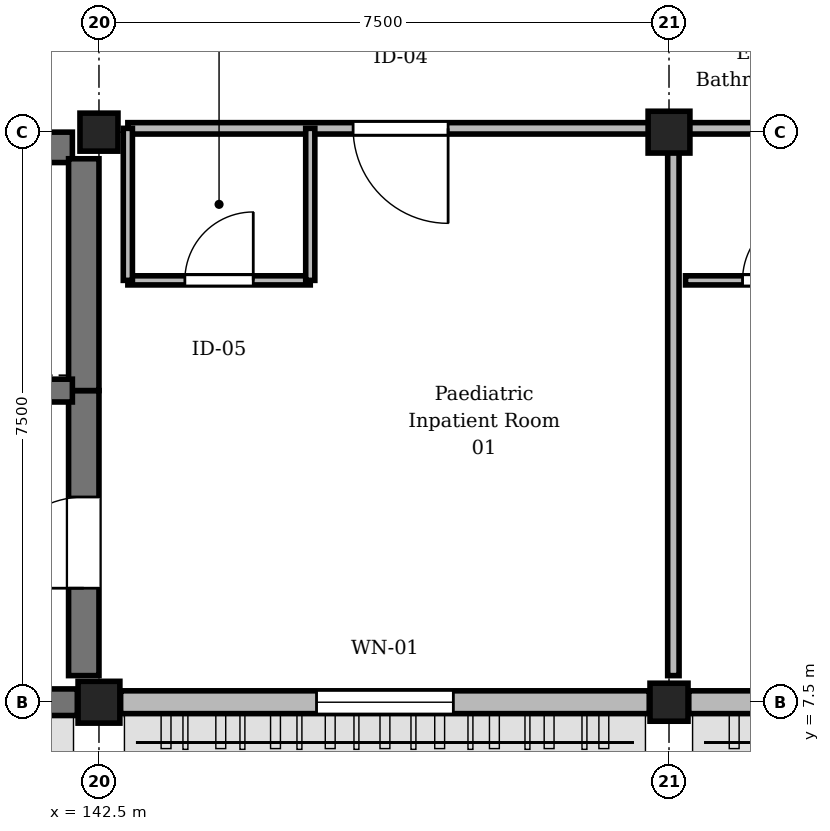
"""IFC4 building model, lengths in metres.
Left out: names, types, materials, properties, quantities, classifications, styles, units other than length and angle.
Written with IfcOpenShell. Run it as: python <this file> out.ifc"""

import sys

from ifc_helpers import new_model, si_unit, direction, frame, frame_2d, origin, origin_2d, place, context, subcontext, project, spatial, rectangle, extrude, element, fill, save


model = new_model("IFC4")
c1 = context("Model", 3, precision=1e-05, world=origin(), true_north=direction((0.0, 1.0)))
c2 = subcontext(c1, "Body", "Model", "MODEL_VIEW")
j1 = project(units=[si_unit("LENGTHUNIT", "METRE"), si_unit("PLANEANGLEUNIT", "RADIAN")], contexts=[c1])
p1 = place(None, origin())
s1 = spatial("IfcSite", under=j1, at=p1, CompositionType="ELEMENT")
p2 = place(p1, origin())
s2 = spatial("IfcBuilding", under=s1, at=p2, CompositionType="ELEMENT")
p3 = place(p2, frame((0.0, 0.0, 17.85)))
s3 = spatial("IfcBuildingStorey", under=s2, at=p3, CompositionType="ELEMENT", Elevation=17.85)
p4 = place(p3, frame((142.5, 7.5, 0.0), z_axis=(0.0, 0.0, 1.0), x_axis=(1.0, 0.0, 0.0)))
e1 = element("IfcColumn", 1, at=p4, inside=s3, PredefinedType="COLUMN", context=c2, shape_type="SweptSolid", body=[
    extrude(rectangle(XDim=0.55, YDim=0.55, at=origin_2d()), origin(), (0.0, 0.0, 1.0), 4.05),
])
for number, where, z_axis, x_axis in (
    (2, (142.5, 15.0, 0.0), (0.0, 0.0, 1.0), (1.0, 0.0, 0.0)),
    (3, (150.0, 7.5, 0.0), (0.0, 0.0, 1.0), (1.0, 0.0, 0.0)),
):
    element("IfcColumn", number, at=place(p3, frame(where, z_axis=z_axis, x_axis=x_axis)), inside=s3, PredefinedType="COLUMN", context=c2, shape_type="SweptSolid", body=[
        extrude(rectangle(XDim=0.5, YDim=0.5, at=origin_2d()), origin(), (0.0, 0.0, 1.0), 4.05),
    ])
p5 = place(p3, frame((150.0, 15.0, 0.0), z_axis=(0.0, 0.0, 1.0), x_axis=(1.0, 0.0, 0.0)))
e4 = element("IfcColumn", 4, at=p5, inside=s3, PredefinedType="COLUMN", context=c2, shape_type="SweptSolid", body=[
    extrude(rectangle(XDim=0.55, YDim=0.55, at=origin_2d()), origin(), (0.0, 0.0, 1.0), 4.05),
])
p6 = place(p3, frame((142.215, 7.5, 0.0), z_axis=(0.0, 0.0, 1.0), x_axis=(-1.0, 0.0, 0.0)))
e5 = element("IfcWall", 5, at=p6, inside=s3, PredefinedType="SHEAR", context=c2, shape_type="SweptSolid", body=[
    extrude(rectangle(XDim=6.955, YDim=0.35, at=frame_2d((3.478, 0.0))), origin(), (0.0, 0.0, 1.0), 3.77),
])
p7 = place(p3, frame((149.74, 7.5, 0.0), z_axis=(0.0, 0.0, 1.0), x_axis=(-1.0, 0.0, 0.0)))
e6 = element("IfcWall", 6, at=p7, inside=s3, PredefinedType="STANDARD", context=c2, shape_type="SweptSolid", body=[
    extrude(rectangle(XDim=6.955, YDim=0.3, at=frame_2d((3.478, 0.0))), origin(), (0.0, 0.0, 1.0), 3.17),
])
p8 = place(p7, frame((2.577, 0.0, 0.9)))
e7 = element("IfcOpeningElement", 7, at=p8, cuts=e6, PredefinedType="OPENING", context=c2, shape_type="SweptSolid", body=[
    extrude(rectangle(XDim=1.8, YDim=1.99, at=frame_2d((0.9, 0.995))), frame((0.0, 0.16, 0.0), z_axis=(0.0, -1.0, 0.0), x_axis=(1.0, 0.0, 0.0)), (0.0, 0.0, 1.0), 0.32),
])
p9 = place(p3, frame((157.215, 7.5, 0.0), z_axis=(0.0, 0.0, 1.0), x_axis=(-1.0, 0.0, 0.0)))
e8 = element("IfcWall", 8, at=p9, inside=s3, PredefinedType="STANDARD", context=c2, shape_type="SweptSolid", body=[
    extrude(rectangle(XDim=6.955, YDim=0.3, at=frame_2d((3.478, 0.0))), origin(), (0.0, 0.0, 1.0), 3.17),
])
p10 = place(p9, frame((2.728, 0.0, 0.9)))
e9 = element("IfcOpeningElement", 9, at=p10, cuts=e8, PredefinedType="OPENING", context=c2, shape_type="SweptSolid", body=[
    extrude(rectangle(XDim=1.5, YDim=1.99, at=frame_2d((0.75, 0.995))), frame((0.0, 0.16, 0.0), z_axis=(0.0, -1.0, 0.0), x_axis=(1.0, 0.0, 0.0)), (0.0, 0.0, 1.0), 0.32),
])
p11 = place(p3, frame((127.85, 14.8, 0.0), z_axis=(0.0, 0.0, 1.0), x_axis=(1.0, 0.0, 0.0)))
e10 = element("IfcWall", 10, at=p11, inside=s3, PredefinedType="SHEAR", context=c2, shape_type="SweptSolid", body=[
    extrude(rectangle(XDim=14.3, YDim=0.4, at=frame_2d((7.15, 0.0))), origin(), (0.0, 0.0, 1.0), 3.77),
])
p12 = place(p3, frame((142.3, 7.85, 0.0), z_axis=(0.0, 0.0, 1.0), x_axis=(0.0, 1.0, 0.0)))
e11 = element("IfcWall", 11, at=p12, inside=s3, PredefinedType="SHEAR", context=c2, shape_type="SweptSolid", body=[
    extrude(rectangle(XDim=3.75, YDim=0.4, at=frame_2d((1.875, 0.0))), origin(), (0.0, 0.0, 1.0), 3.77),
])
p13 = place(p12, frame((1.15, 0.0, 0.0)))
e12 = element("IfcOpeningElement", 12, at=p13, cuts=e11, PredefinedType="OPENING", context=c2, shape_type="SweptSolid", body=[
    extrude(rectangle(XDim=1.2, YDim=2.25, at=frame_2d((0.6, 1.125))), frame((0.0, 0.21, 0.0), z_axis=(0.0, -1.0, 0.0), x_axis=(1.0, 0.0, 0.0)), (0.0, 0.0, 1.0), 0.42),
])
p14 = place(p3, frame((142.3, 11.6, 0.0), z_axis=(0.0, 0.0, 1.0), x_axis=(0.0, 1.0, 0.0)))
e13 = element("IfcWall", 13, at=p14, inside=s3, PredefinedType="SHEAR", context=c2, shape_type="SweptSolid", body=[
    extrude(rectangle(XDim=3.05, YDim=0.4, at=frame_2d((1.525, 0.0))), origin(), (0.0, 0.0, 1.0), 3.77),
])
p15 = place(p3, frame((135.9, 11.6, 0.0), z_axis=(0.0, 0.0, 1.0), x_axis=(1.0, 0.0, 0.0)))
e14 = element("IfcWall", 14, at=p15, inside=s3, PredefinedType="SHEAR", context=c2, shape_type="SweptSolid", body=[
    extrude(rectangle(XDim=6.25, YDim=0.3, at=frame_2d((3.125, 0.0))), origin(), (0.0, 0.0, 1.0), 3.77),
])
p16 = place(p15, frame((0.95, 0.0, 0.0)))
e15 = element("IfcOpeningElement", 15, at=p16, cuts=e14, PredefinedType="OPENING", context=c2, shape_type="SweptSolid", body=[
    extrude(rectangle(XDim=1.3, YDim=2.2, at=frame_2d((0.65, 1.1))), frame((0.0, 0.16, 0.0), z_axis=(0.0, -1.0, 0.0), x_axis=(1.0, 0.0, 0.0)), (0.0, 0.0, 1.0), 0.32),
])
p17 = place(p15, frame((4.15, 0.0, 0.0)))
e16 = element("IfcOpeningElement", 16, at=p17, cuts=e14, PredefinedType="OPENING", context=c2, shape_type="SweptSolid", body=[
    extrude(rectangle(XDim=1.3, YDim=2.2, at=frame_2d((0.65, 1.1))), frame((0.0, 0.16, 0.0), z_axis=(0.0, -1.0, 0.0), x_axis=(1.0, 0.0, 0.0)), (0.0, 0.0, 1.0), 0.32),
])
p18 = place(p3, frame((150.058, 15.05, 0.0), z_axis=(0.0, 0.0, 1.0), x_axis=(-1.0, 0.0, 0.0)))
e17 = element("IfcWall", 17, at=p18, inside=s3, PredefinedType="PARTITIONING", context=c2, shape_type="SweptSolid", body=[
    extrude(rectangle(XDim=7.178, YDim=0.15, at=frame_2d((3.589, 0.0))), origin(), (0.0, 0.0, 1.0), 3.205),
])
p19 = place(p18, frame((2.964, 0.0, 0.0)))
e18 = element("IfcOpeningElement", 18, at=p19, cuts=e17, PredefinedType="OPENING", context=c2, shape_type="SweptSolid", body=[
    extrude(rectangle(XDim=1.25, YDim=2.2, at=frame_2d((0.625, 1.1))), frame((0.0, 0.085, 0.0), z_axis=(0.0, -1.0, 0.0), x_axis=(1.0, 0.0, 0.0)), (0.0, 0.0, 1.0), 0.17),
])
p20 = place(p3, frame((142.88, 13.05, 0.0), z_axis=(0.0, 0.0, 1.0), x_axis=(1.0, 0.0, 0.0)))
e19 = element("IfcWall", 19, at=p20, inside=s3, PredefinedType="PARTITIONING", context=c2, shape_type="SweptSolid", body=[
    extrude(rectangle(XDim=2.4, YDim=0.12, at=frame_2d((1.2, 0.0))), origin(), (0.0, 0.0, 1.0), 3.755),
])
p21 = place(p20, frame((0.75, 0.0, 0.0)))
e20 = element("IfcOpeningElement", 20, at=p21, cuts=e19, PredefinedType="OPENING", context=c2, shape_type="SweptSolid", body=[
    extrude(rectangle(XDim=0.9, YDim=2.1, at=frame_2d((0.45, 1.05))), frame((0.0, 0.07, 0.0), z_axis=(0.0, -1.0, 0.0), x_axis=(1.0, 0.0, 0.0)), (0.0, 0.0, 1.0), 0.14),
])
p22 = place(p3, frame((145.28, 13.05, 0.0), z_axis=(0.0, 0.0, 1.0), x_axis=(0.0, 1.0, 0.0)))
e21 = element("IfcWall", 21, at=p22, inside=s3, PredefinedType="PARTITIONING", context=c2, shape_type="SweptSolid", body=[
    extrude(rectangle(XDim=2.0, YDim=0.12, at=frame_2d((1.0, 0.0))), origin(), (0.0, 0.0, 1.0), 3.755),
])
p23 = place(p3, frame((157.395, 15.05, 0.0), z_axis=(0.0, 0.0, 1.0), x_axis=(-1.0, 0.0, 0.0)))
e22 = element("IfcWall", 22, at=p23, inside=s3, PredefinedType="PARTITIONING", context=c2, shape_type="SweptSolid", body=[
    extrude(rectangle(XDim=7.177, YDim=0.15, at=frame_2d((3.589, 0.0))), origin(), (0.0, 0.0, 1.0), 3.155),
])
p24 = place(p23, frame((2.964, 0.0, 0.0)))
e23 = element("IfcOpeningElement", 23, at=p24, cuts=e22, PredefinedType="OPENING", context=c2, shape_type="SweptSolid", body=[
    extrude(rectangle(XDim=1.25, YDim=2.2, at=frame_2d((0.625, 1.1))), frame((0.0, 0.085, 0.0), z_axis=(0.0, -1.0, 0.0), x_axis=(1.0, 0.0, 0.0)), (0.0, 0.0, 1.0), 0.17),
])
p25 = place(p3, frame((150.218, 13.05, 0.0), z_axis=(0.0, 0.0, 1.0), x_axis=(1.0, 0.0, 0.0)))
e24 = element("IfcWall", 24, at=p25, inside=s3, PredefinedType="PARTITIONING", context=c2, shape_type="SweptSolid", body=[
    extrude(rectangle(XDim=2.4, YDim=0.12, at=frame_2d((1.2, 0.0))), origin(), (0.0, 0.0, 1.0), 3.755),
])
p26 = place(p25, frame((0.75, 0.0, 0.0)))
e25 = element("IfcOpeningElement", 25, at=p26, cuts=e24, PredefinedType="OPENING", context=c2, shape_type="SweptSolid", body=[
    extrude(rectangle(XDim=0.9, YDim=2.1, at=frame_2d((0.45, 1.05))), frame((0.0, 0.07, 0.0), z_axis=(0.0, -1.0, 0.0), x_axis=(1.0, 0.0, 0.0)), (0.0, 0.0, 1.0), 0.14),
])
p27 = place(p3, frame((150.058, 7.85, 0.0), z_axis=(0.0, 0.0, 1.0), x_axis=(0.0, 1.0, 0.0)))
e26 = element("IfcWall", 26, at=p27, inside=s3, PredefinedType="PARTITIONING", context=c2, shape_type="SweptSolid", body=[
    extrude(rectangle(XDim=7.2, YDim=0.15, at=frame_2d((3.6, 0.0))), origin(), (0.0, 0.0, 1.0), 3.255),
])
p28 = place(p3, frame((142.88, 13.05, 0.0), z_axis=(0.0, 0.0, 1.0), x_axis=(0.0, 1.0, 0.0)))
e27 = element("IfcWall", 27, at=p28, inside=s3, PredefinedType="PARTITIONING", context=c2, shape_type="SweptSolid", body=[
    extrude(rectangle(XDim=2.0, YDim=0.12, at=frame_2d((1.0, 0.0))), origin(), (0.0, 0.0, 1.0), 3.205),
])
p29 = place(p8, origin())
e28 = element("IfcWindow", 28, at=p29, inside=s3, PartitioningType="SINGLE_PANEL", PredefinedType="WINDOW", context=c2, shape_type="SweptSolid", body=[
    extrude(rectangle(XDim=1.8, YDim=1.99, at=frame_2d((0.9, 0.995))), frame((0.0, 0.03, 0.0), z_axis=(0.0, -1.0, 0.0), x_axis=(1.0, 0.0, 0.0)), (0.0, 0.0, 1.0), 0.06),
])
fill(e7, e28)
p30 = place(p13, origin())
e29 = element("IfcDoor", 29, at=p30, inside=s3, OperationType="SINGLE_SWING_LEFT", PredefinedType="DOOR", context=c2, shape_type="SweptSolid", body=[
    extrude(rectangle(XDim=1.2, YDim=2.25, at=frame_2d((0.6, 1.125))), frame((0.0, 0.025, 0.0), z_axis=(0.0, -1.0, 0.0), x_axis=(1.0, 0.0, 0.0)), (0.0, 0.0, 1.0), 0.05),
])
fill(e12, e29)
p31 = place(p19, origin())
e30 = element("IfcDoor", 30, at=p31, inside=s3, OperationType="SINGLE_SWING_LEFT", PredefinedType="DOOR", context=c2, shape_type="SweptSolid", body=[
    extrude(rectangle(XDim=1.25, YDim=2.2, at=frame_2d((0.625, 1.1))), frame((0.0, 0.025, 0.0), z_axis=(0.0, -1.0, 0.0), x_axis=(1.0, 0.0, 0.0)), (0.0, 0.0, 1.0), 0.05),
])
fill(e18, e30)
p32 = place(p21, origin())
e31 = element("IfcDoor", 31, at=p32, inside=s3, OperationType="SINGLE_SWING_RIGHT", PredefinedType="DOOR", context=c2, shape_type="SweptSolid", body=[
    extrude(rectangle(XDim=0.9, YDim=2.1, at=frame_2d((0.45, 1.05))), frame((0.0, 0.025, 0.0), z_axis=(0.0, -1.0, 0.0), x_axis=(1.0, 0.0, 0.0)), (0.0, 0.0, 1.0), 0.05),
])
fill(e20, e31)
p33 = place(p26, origin())
e32 = element("IfcDoor", 32, at=p33, inside=s3, OperationType="SINGLE_SWING_RIGHT", PredefinedType="DOOR", context=c2, shape_type="SweptSolid", body=[
    extrude(rectangle(XDim=0.9, YDim=2.1, at=frame_2d((0.45, 1.05))), frame((0.0, 0.025, 0.0), z_axis=(0.0, -1.0, 0.0), x_axis=(1.0, 0.0, 0.0)), (0.0, 0.0, 1.0), 0.05),
])
fill(e25, e32)
save(model, sys.argv[1])
